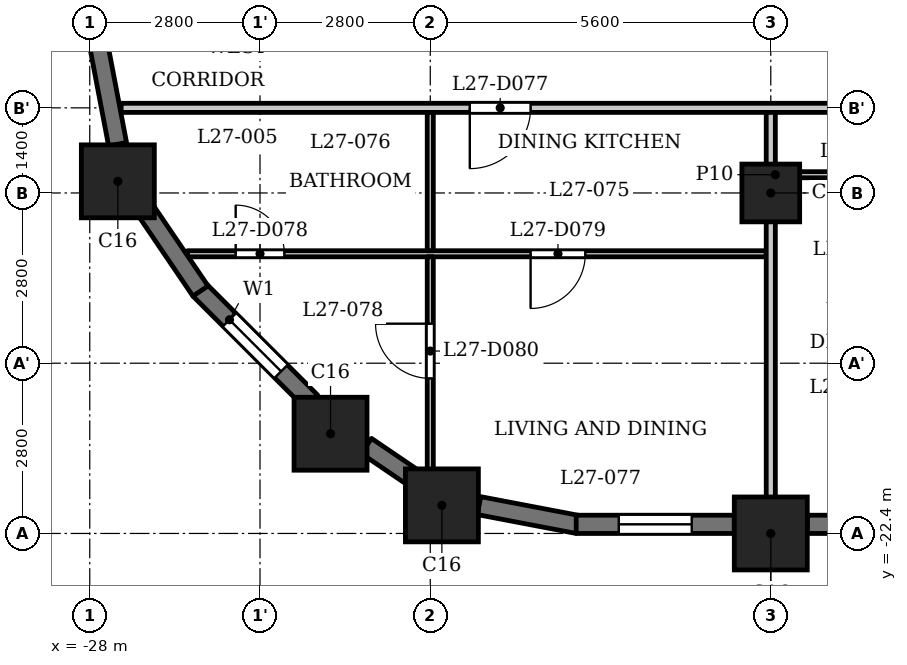
"""IFC4 building model, lengths in metres.
Left out: names, types, materials, properties, quantities, classifications, styles, units other than length and angle.
Written with IfcOpenShell. Run it as: python <this file> out.ifc"""

import sys

from ifc_helpers import new_model, si_unit, direction, frame, frame_2d, origin, origin_2d, place, context, subcontext, project, spatial, rectangle, extrude, element, fill, save


model = new_model("IFC4")
c1 = context("Model", 3, precision=1e-05, world=origin(), true_north=direction((0.0, 1.0)))
c2 = subcontext(c1, "Body", "Model", "MODEL_VIEW")
j1 = project(units=[si_unit("LENGTHUNIT", "METRE"), si_unit("PLANEANGLEUNIT", "RADIAN")], contexts=[c1])
p1 = place(None, origin())
s1 = spatial("IfcSite", under=j1, at=p1, CompositionType="ELEMENT")
p2 = place(p1, origin())
s2 = spatial("IfcBuilding", under=s1, at=p2, CompositionType="ELEMENT")
p3 = place(p2, frame((0.0, 0.0, 107.8)))
s3 = spatial("IfcBuildingStorey", under=s2, at=p3, CompositionType="ELEMENT", Elevation=107.8)
for number, where, z_axis, x_axis in (
    (1, (-22.209, -21.938, 0.0), (0.0, 0.0, 1.0), (1.0, 0.0, 0.0)),
    (2, (-16.8, -22.4, 0.0), (0.0, 0.0, 1.0), (1.0, 0.0, 0.0)),
    (3, (-27.538, -16.609, 0.0), (0.0, 0.0, 1.0), (1.0, 0.0, 0.0)),
    (4, (-24.04, -20.76, 0.0), (0.0, 0.0, 1.0), (1.0, 0.0, 0.0)),
):
    element("IfcColumn", number, at=place(p3, frame(where, z_axis=z_axis, x_axis=x_axis)), inside=s3, PredefinedType="COLUMN", context=c2, shape_type="SweptSolid", body=[
        extrude(rectangle(XDim=1.2, YDim=1.2, at=origin_2d()), origin(), (0.0, 0.0, 1.0), 3.5),
    ])
p4 = place(p3, frame((-16.8, -16.8, 0.0), z_axis=(0.0, 0.0, 1.0), x_axis=(1.0, 0.0, 0.0)))
e5 = element("IfcColumn", 5, at=p4, inside=s3, PredefinedType="COLUMN", context=c2, shape_type="SweptSolid", body=[
    extrude(rectangle(XDim=0.95, YDim=0.95, at=origin_2d()), origin(), (0.0, 0.0, 1.0), 3.5),
])
p5 = place(p3, frame((-26.197, -18.391, 0.0), z_axis=(0.0, 0.0, 1.0), x_axis=(0.707059830104, -0.707153729152, 0.0)))
e6 = element("IfcWall", 6, at=p5, inside=s3, PredefinedType="SOLIDWALL", context=c2, shape_type="SweptSolid", body=[
    extrude(rectangle(XDim=2.6, YDim=0.3, at=frame_2d((1.3, 0.0))), origin(), (0.0, 0.0, 1.0), 2.4),
])
p6 = place(p5, frame((0.7, 0.0, 0.6)))
e7 = element("IfcOpeningElement", 7, at=p6, cuts=e6, PredefinedType="OPENING", context=c2, shape_type="SweptSolid", body=[
    extrude(rectangle(XDim=1.2, YDim=1.55, at=frame_2d((0.6, 0.775))), frame((0.0, 0.16, 0.0), z_axis=(0.0, -1.0, 0.0), x_axis=(1.0, 0.0, 0.0)), (0.0, 0.0, 1.0), 0.32),
])
p7 = place(p3, frame((-23.451, -20.96, 0.0), z_axis=(0.0, 0.0, 1.0), x_axis=(0.827019434577, -0.562173331661, 0.0)))
e8 = element("IfcWall", 8, at=p7, inside=s3, PredefinedType="SOLIDWALL", context=c2, shape_type="SweptSolid", body=[
    extrude(rectangle(XDim=0.977, YDim=0.3, at=frame_2d((0.489, 0.0))), origin(), (0.0, 0.0, 1.0), 3.2),
])
p8 = place(p3, frame((-21.599, -21.942, 0.0), z_axis=(0.0, 0.0, 1.0), x_axis=(0.98228820662, -0.187376303559, 0.0)))
e9 = element("IfcWall", 9, at=p8, inside=s3, PredefinedType="SOLIDWALL", context=c2, shape_type="SweptSolid", body=[
    extrude(rectangle(XDim=1.656, YDim=0.3, at=frame_2d((0.828, 0.0))), origin(), (0.0, 0.0, 1.0), 2.4),
])
p9 = place(p3, frame((-20.0, -22.25, 0.0), z_axis=(0.0, 0.0, 1.0), x_axis=(1.0, 0.0, 0.0)))
e10 = element("IfcWall", 10, at=p9, inside=s3, PredefinedType="SOLIDWALL", context=c2, shape_type="SweptSolid", body=[
    extrude(rectangle(XDim=2.6, YDim=0.3, at=frame_2d((1.3, 0.0))), origin(), (0.0, 0.0, 1.0), 2.4),
])
p10 = place(p9, frame((0.7, 0.0, 0.6)))
e11 = element("IfcOpeningElement", 11, at=p10, cuts=e10, PredefinedType="OPENING", context=c2, shape_type="SweptSolid", body=[
    extrude(rectangle(XDim=1.2, YDim=1.55, at=frame_2d((0.6, 0.775))), frame((0.0, 0.16, 0.0), z_axis=(0.0, -1.0, 0.0), x_axis=(1.0, 0.0, 0.0)), (0.0, 0.0, 1.0), 0.32),
])
p11 = place(p3, frame((-16.2, -22.25, 0.0), z_axis=(0.0, 0.0, 1.0), x_axis=(1.0, 0.0, 0.0)))
e12 = element("IfcWall", 12, at=p11, inside=s3, PredefinedType="SOLIDWALL", context=c2, shape_type="SweptSolid", body=[
    extrude(rectangle(XDim=4.4, YDim=0.3, at=frame_2d((2.2, 0.0))), origin(), (0.0, 0.0, 1.0), 2.4),
])
p12 = place(p11, frame((0.363, 0.0, 0.6)))
e13 = element("IfcOpeningElement", 13, at=p12, cuts=e12, PredefinedType="OPENING", context=c2, shape_type="SweptSolid", body=[
    extrude(rectangle(XDim=1.2, YDim=1.55, at=frame_2d((0.6, 0.775))), frame((0.0, 0.16, 0.0), z_axis=(0.0, -1.0, 0.0), x_axis=(1.0, 0.0, 0.0)), (0.0, 0.0, 1.0), 0.32),
])
p13 = place(p11, frame((2.337, 0.0, 0.9)))
e14 = element("IfcOpeningElement", 14, at=p13, cuts=e12, PredefinedType="OPENING", context=c2, shape_type="SweptSolid", body=[
    extrude(rectangle(XDim=1.8, YDim=1.25, at=frame_2d((0.9, 0.625))), frame((0.0, 0.16, 0.0), z_axis=(0.0, -1.0, 0.0), x_axis=(1.0, 0.0, 0.0)), (0.0, 0.0, 1.0), 0.32),
])
for number, where, z_axis, x_axis in (
    (15, (-27.853, -14.372, 0.0), (0.0, 0.0, 1.0), (0.187, -0.982, 0.0)),
    (16, (-27.11, -17.043, 0.0), (0.0, 0.0, 1.0), (0.562, -0.827, 0.0)),
):
    element("IfcWall", number, at=place(p3, frame(where, z_axis=z_axis, x_axis=x_axis)), inside=s3, PredefinedType="SOLIDWALL", context=c2, shape_type="SweptSolid", body=[
        extrude(rectangle(XDim=1.656, YDim=0.3, at=frame_2d((0.828, 0.0))), origin(), (0.0, 0.0, 1.0), 2.4),
    ])
p14 = place(p3, frame((-26.394, -17.8, 0.0), z_axis=(0.0, 0.0, 1.0), x_axis=(1.0, 0.0, 0.0)))
e17 = element("IfcWall", 17, at=p14, inside=s3, PredefinedType="PARTITIONING", context=c2, shape_type="SweptSolid", body=[
    extrude(rectangle(XDim=9.519, YDim=0.1, at=frame_2d((4.76, 0.0))), origin(), (0.0, 0.0, 1.0), 3.2),
])
p15 = place(p14, frame((0.794, 0.0, 0.0)))
e18 = element("IfcOpeningElement", 18, at=p15, cuts=e17, PredefinedType="OPENING", context=c2, shape_type="SweptSolid", body=[
    extrude(rectangle(XDim=0.8, YDim=2.1, at=frame_2d((0.4, 1.05))), frame((0.0, 0.06, 0.0), z_axis=(0.0, -1.0, 0.0), x_axis=(1.0, 0.0, 0.0)), (0.0, 0.0, 1.0), 0.12),
])
p16 = place(p14, frame((5.644, 0.0, 0.0)))
e19 = element("IfcOpeningElement", 19, at=p16, cuts=e17, PredefinedType="OPENING", context=c2, shape_type="SweptSolid", body=[
    extrude(rectangle(XDim=0.9, YDim=2.1, at=frame_2d((0.45, 1.05))), frame((0.0, 0.06, 0.0), z_axis=(0.0, -1.0, 0.0), x_axis=(1.0, 0.0, 0.0)), (0.0, 0.0, 1.0), 0.12),
])
p17 = place(p3, frame((-16.725, -16.5, 0.0), z_axis=(0.0, 0.0, 1.0), x_axis=(1.0, 0.0, 0.0)))
e20 = element("IfcWall", 20, at=p17, inside=s3, PredefinedType="PARTITIONING", context=c2, shape_type="SweptSolid", body=[
    extrude(rectangle(XDim=33.45, YDim=0.1, at=frame_2d((16.725, 0.0))), origin(), (0.0, 0.0, 1.0), 3.2),
])
p18 = place(p17, frame((4.075, 0.0, 0.0)))
e21 = element("IfcOpeningElement", 21, at=p18, cuts=e20, PredefinedType="OPENING", context=c2, shape_type="SweptSolid", body=[
    extrude(rectangle(XDim=0.8, YDim=2.1, at=frame_2d((0.4, 1.05))), frame((0.0, 0.06, 0.0), z_axis=(0.0, -1.0, 0.0), x_axis=(1.0, 0.0, 0.0)), (0.0, 0.0, 1.0), 0.12),
])
p19 = place(p17, frame((1.075, 0.0, 0.0)))
e22 = element("IfcOpeningElement", 22, at=p19, cuts=e20, PredefinedType="OPENING", context=c2, shape_type="SweptSolid", body=[
    extrude(rectangle(XDim=0.9, YDim=2.1, at=frame_2d((0.45, 1.05))), frame((0.0, 0.06, 0.0), z_axis=(0.0, -1.0, 0.0), x_axis=(1.0, 0.0, 0.0)), (0.0, 0.0, 1.0), 0.12),
])
p20 = place(p17, frame((9.675, 0.0, 0.0)))
e23 = element("IfcOpeningElement", 23, at=p20, cuts=e20, PredefinedType="OPENING", context=c2, shape_type="SweptSolid", body=[
    extrude(rectangle(XDim=0.8, YDim=2.1, at=frame_2d((0.4, 1.05))), frame((0.0, 0.06, 0.0), z_axis=(0.0, -1.0, 0.0), x_axis=(1.0, 0.0, 0.0)), (0.0, 0.0, 1.0), 0.12),
])
p21 = place(p17, frame((7.675, 0.0, 0.0)))
e24 = element("IfcOpeningElement", 24, at=p21, cuts=e20, PredefinedType="OPENING", context=c2, shape_type="SweptSolid", body=[
    extrude(rectangle(XDim=0.9, YDim=2.1, at=frame_2d((0.45, 1.05))), frame((0.0, 0.06, 0.0), z_axis=(0.0, -1.0, 0.0), x_axis=(1.0, 0.0, 0.0)), (0.0, 0.0, 1.0), 0.12),
])
p22 = place(p17, frame((15.275, 0.0, 0.0)))
e25 = element("IfcOpeningElement", 25, at=p22, cuts=e20, PredefinedType="OPENING", context=c2, shape_type="SweptSolid", body=[
    extrude(rectangle(XDim=0.8, YDim=2.1, at=frame_2d((0.4, 1.05))), frame((0.0, 0.06, 0.0), z_axis=(0.0, -1.0, 0.0), x_axis=(1.0, 0.0, 0.0)), (0.0, 0.0, 1.0), 0.12),
])
p23 = place(p17, frame((11.775, 0.0, 0.0)))
e26 = element("IfcOpeningElement", 26, at=p23, cuts=e20, PredefinedType="OPENING", context=c2, shape_type="SweptSolid", body=[
    extrude(rectangle(XDim=0.9, YDim=2.1, at=frame_2d((0.45, 1.05))), frame((0.0, 0.06, 0.0), z_axis=(0.0, -1.0, 0.0), x_axis=(1.0, 0.0, 0.0)), (0.0, 0.0, 1.0), 0.12),
])
p24 = place(p17, frame((20.625, 0.0, 0.0)))
e27 = element("IfcOpeningElement", 27, at=p24, cuts=e20, PredefinedType="OPENING", context=c2, shape_type="SweptSolid", body=[
    extrude(rectangle(XDim=0.8, YDim=2.1, at=frame_2d((0.4, 1.05))), frame((0.0, 0.06, 0.0), z_axis=(0.0, -1.0, 0.0), x_axis=(1.0, 0.0, 0.0)), (0.0, 0.0, 1.0), 0.12),
])
p25 = place(p17, frame((18.375, 0.0, 0.0)))
e28 = element("IfcOpeningElement", 28, at=p25, cuts=e20, PredefinedType="OPENING", context=c2, shape_type="SweptSolid", body=[
    extrude(rectangle(XDim=0.9, YDim=2.1, at=frame_2d((0.45, 1.05))), frame((0.0, 0.06, 0.0), z_axis=(0.0, -1.0, 0.0), x_axis=(1.0, 0.0, 0.0)), (0.0, 0.0, 1.0), 0.12),
])
p26 = place(p17, frame((26.475, 0.0, 0.0)))
e29 = element("IfcOpeningElement", 29, at=p26, cuts=e20, PredefinedType="OPENING", context=c2, shape_type="SweptSolid", body=[
    extrude(rectangle(XDim=0.8, YDim=2.1, at=frame_2d((0.4, 1.05))), frame((0.0, 0.06, 0.0), z_axis=(0.0, -1.0, 0.0), x_axis=(1.0, 0.0, 0.0)), (0.0, 0.0, 1.0), 0.12),
])
p27 = place(p17, frame((23.225, 0.0, 0.0)))
e30 = element("IfcOpeningElement", 30, at=p27, cuts=e20, PredefinedType="OPENING", context=c2, shape_type="SweptSolid", body=[
    extrude(rectangle(XDim=0.9, YDim=2.1, at=frame_2d((0.45, 1.05))), frame((0.0, 0.06, 0.0), z_axis=(0.0, -1.0, 0.0), x_axis=(1.0, 0.0, 0.0)), (0.0, 0.0, 1.0), 0.12),
])
p28 = place(p17, frame((29.475, 0.0, 0.0)))
e31 = element("IfcOpeningElement", 31, at=p28, cuts=e20, PredefinedType="OPENING", context=c2, shape_type="SweptSolid", body=[
    extrude(rectangle(XDim=0.8, YDim=2.1, at=frame_2d((0.4, 1.05))), frame((0.0, 0.06, 0.0), z_axis=(0.0, -1.0, 0.0), x_axis=(1.0, 0.0, 0.0)), (0.0, 0.0, 1.0), 0.12),
])
p29 = place(p17, frame((31.825, 0.0, 0.0)))
e32 = element("IfcOpeningElement", 32, at=p29, cuts=e20, PredefinedType="OPENING", context=c2, shape_type="SweptSolid", body=[
    extrude(rectangle(XDim=0.9, YDim=2.1, at=frame_2d((0.45, 1.05))), frame((0.0, 0.06, 0.0), z_axis=(0.0, -1.0, 0.0), x_axis=(1.0, 0.0, 0.0)), (0.0, 0.0, 1.0), 0.12),
])
p30 = place(p3, frame((-27.484, -15.4, 0.0), z_axis=(0.0, 0.0, 1.0), x_axis=(1.0, 0.0, 0.0)))
e33 = element("IfcWall", 33, at=p30, inside=s3, PredefinedType="PARTITIONING", context=c2, shape_type="SweptSolid", body=[
    extrude(rectangle(XDim=12.559, YDim=0.15, at=frame_2d((6.279, 0.0))), origin(), (0.0, 0.0, 1.0), 3.2),
])
p31 = place(p30, frame((5.734, 0.0, 0.0)))
e34 = element("IfcOpeningElement", 34, at=p31, cuts=e33, PredefinedType="OPENING", context=c2, shape_type="SweptSolid", body=[
    extrude(rectangle(XDim=1.0, YDim=2.1, at=frame_2d((0.5, 1.05))), frame((0.0, 0.085, 0.0), z_axis=(0.0, -1.0, 0.0), x_axis=(1.0, 0.0, 0.0)), (0.0, 0.0, 1.0), 0.17),
])
p32 = place(p3, frame((-22.4, -21.72, 0.0), z_axis=(0.0, 0.0, 1.0), x_axis=(0.0, 1.0, 0.0)))
e35 = element("IfcWall", 35, at=p32, inside=s3, PredefinedType="PARTITIONING", context=c2, shape_type="SweptSolid", body=[
    extrude(rectangle(XDim=3.87, YDim=0.1, at=frame_2d((1.935, 0.0))), origin(), (0.0, 0.0, 1.0), 3.2),
])
p33 = place(p32, frame((1.87, 0.0, 0.0)))
e36 = element("IfcOpeningElement", 36, at=p33, cuts=e35, PredefinedType="OPENING", context=c2, shape_type="SweptSolid", body=[
    extrude(rectangle(XDim=0.9, YDim=2.1, at=frame_2d((0.45, 1.05))), frame((0.0, 0.06, 0.0), z_axis=(0.0, -1.0, 0.0), x_axis=(1.0, 0.0, 0.0)), (0.0, 0.0, 1.0), 0.12),
])
p34 = place(p3, frame((-22.4, -17.75, 0.0), z_axis=(0.0, 0.0, 1.0), x_axis=(0.0, 1.0, 0.0)))
e37 = element("IfcWall", 37, at=p34, inside=s3, PredefinedType="PARTITIONING", context=c2, shape_type="SweptSolid", body=[
    extrude(rectangle(XDim=2.275, YDim=0.1, at=frame_2d((1.137, 0.0))), origin(), (0.0, 0.0, 1.0), 3.2),
])
p35 = place(p3, frame((-16.8, -22.98, 0.0), z_axis=(0.0, 0.0, 1.0), x_axis=(0.0, 1.0, 0.0)))
e38 = element("IfcWall", 38, at=p35, inside=s3, PredefinedType="PARTITIONING", context=c2, shape_type="SweptSolid", body=[
    extrude(rectangle(XDim=7.505, YDim=0.15, at=frame_2d((3.752, 0.0))), origin(), (0.0, 0.0, 1.0), 3.2),
])
p36 = place(p31, origin())
e39 = element("IfcDoor", 39, at=p36, inside=s3, OperationType="SINGLE_SWING_LEFT", PredefinedType="DOOR", context=c2, shape_type="SweptSolid", body=[
    extrude(rectangle(XDim=1.0, YDim=2.1, at=frame_2d((0.5, 1.05))), frame((0.0, 0.025, 0.0), z_axis=(0.0, -1.0, 0.0), x_axis=(1.0, 0.0, 0.0)), (0.0, 0.0, 1.0), 0.05),
])
fill(e34, e39)
p37 = place(p15, origin())
e40 = element("IfcDoor", 40, at=p37, inside=s3, OperationType="SINGLE_SWING_RIGHT", PredefinedType="DOOR", context=c2, shape_type="SweptSolid", body=[
    extrude(rectangle(XDim=0.8, YDim=2.1, at=frame_2d((0.4, 1.05))), frame((0.0, 0.025, 0.0), z_axis=(0.0, -1.0, 0.0), x_axis=(1.0, 0.0, 0.0)), (0.0, 0.0, 1.0), 0.05),
])
fill(e18, e40)
p38 = place(p16, origin())
e41 = element("IfcDoor", 41, at=p38, inside=s3, OperationType="SINGLE_SWING_LEFT", PredefinedType="DOOR", context=c2, shape_type="SweptSolid", body=[
    extrude(rectangle(XDim=0.9, YDim=2.1, at=frame_2d((0.45, 1.05))), frame((0.0, 0.025, 0.0), z_axis=(0.0, -1.0, 0.0), x_axis=(1.0, 0.0, 0.0)), (0.0, 0.0, 1.0), 0.05),
])
fill(e19, e41)
p39 = place(p33, origin())
e42 = element("IfcDoor", 42, at=p39, inside=s3, OperationType="SINGLE_SWING_LEFT", PredefinedType="DOOR", context=c2, shape_type="SweptSolid", body=[
    extrude(rectangle(XDim=0.9, YDim=2.1, at=frame_2d((0.45, 1.05))), frame((0.0, 0.025, 0.0), z_axis=(0.0, -1.0, 0.0), x_axis=(1.0, 0.0, 0.0)), (0.0, 0.0, 1.0), 0.05),
])
fill(e36, e42)
p40 = place(p6, origin())
e43 = element("IfcWindow", 43, at=p40, inside=s3, PartitioningType="SINGLE_PANEL", PredefinedType="WINDOW", context=c2, shape_type="SweptSolid", body=[
    extrude(rectangle(XDim=1.2, YDim=1.55, at=frame_2d((0.6, 0.775))), frame((0.0, 0.03, 0.0), z_axis=(0.0, -1.0, 0.0), x_axis=(1.0, 0.0, 0.0)), (0.0, 0.0, 1.0), 0.06),
])
fill(e7, e43)
p41 = place(p10, origin())
e44 = element("IfcWindow", 44, at=p41, inside=s3, PartitioningType="SINGLE_PANEL", PredefinedType="WINDOW", context=c2, shape_type="SweptSolid", body=[
    extrude(rectangle(XDim=1.2, YDim=1.55, at=frame_2d((0.6, 0.775))), frame((0.0, 0.03, 0.0), z_axis=(0.0, -1.0, 0.0), x_axis=(1.0, 0.0, 0.0)), (0.0, 0.0, 1.0), 0.06),
])
fill(e11, e44)
save(model, sys.argv[1])
